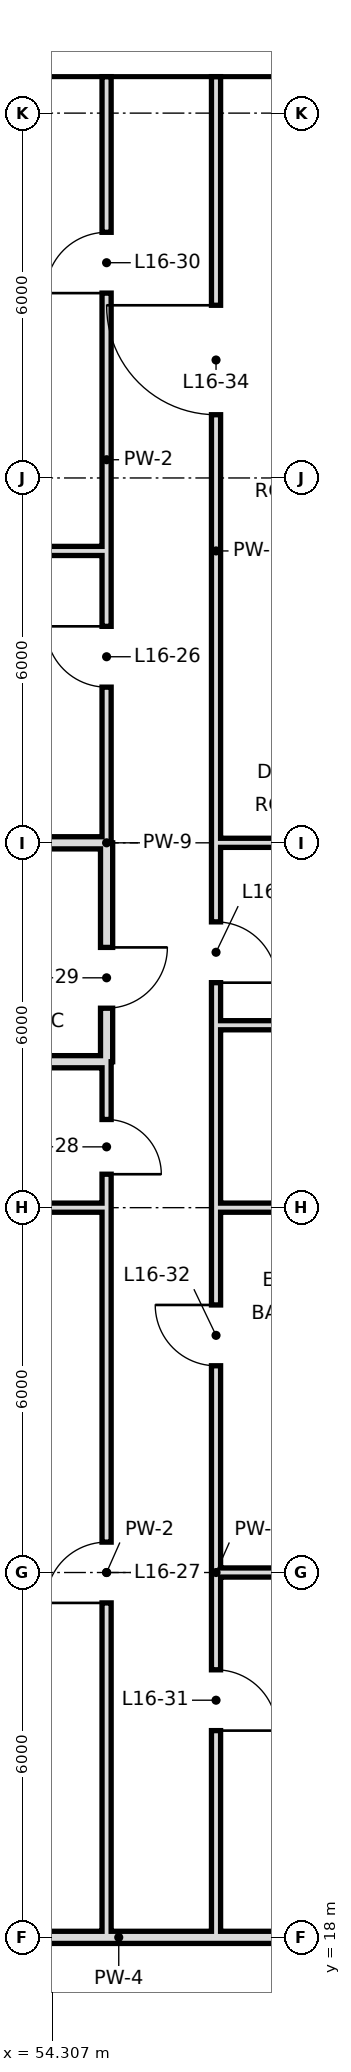
"""IFC4 building model, lengths in metres.
Left out: names, types, materials, properties, quantities, classifications, styles, units other than length and angle.
Written with IfcOpenShell. Run it as: python <this file> out.ifc"""

import sys

from ifc_helpers import new_model, si_unit, direction, frame, frame_2d, origin, place, context, subcontext, project, spatial, rectangle, extrude, element, fill, save


model = new_model("IFC4")
c1 = context("Model", 3, precision=1e-05, world=origin(), true_north=direction((0.0, 1.0)))
c2 = subcontext(c1, "Body", "Model", "MODEL_VIEW")
j1 = project(units=[si_unit("LENGTHUNIT", "METRE"), si_unit("PLANEANGLEUNIT", "RADIAN")], contexts=[c1])
p1 = place(None, origin())
s1 = spatial("IfcSite", under=j1, at=p1, CompositionType="ELEMENT")
p2 = place(p1, origin())
s2 = spatial("IfcBuilding", under=s1, at=p2, CompositionType="ELEMENT")
p3 = place(p2, frame((0.0, 0.0, 78.6)))
s3 = spatial("IfcBuildingStorey", under=s2, at=p3, CompositionType="ELEMENT", Elevation=78.6)
p4 = place(p3, frame((55.2, 32.4, 0.0), z_axis=(0.0, 0.0, 1.0), x_axis=(0.0, 1.0, 0.0)))
e1 = element("IfcWall", 1, at=p4, inside=s3, PredefinedType="SOLIDWALL", context=c2, shape_type="SweptSolid", body=[
    extrude(rectangle(XDim=3.6, YDim=0.2, at=frame_2d((1.8, 0.0))), origin(), (0.0, 0.0, 1.0), 2.52),
])
p5 = place(p4, frame((0.88, 0.0, 0.0)))
e2 = element("IfcOpeningElement", 2, at=p5, cuts=e1, PredefinedType="OPENING", context=c2, shape_type="SweptSolid", body=[
    extrude(rectangle(XDim=1.0, YDim=2.4, at=frame_2d((0.5, 1.2))), frame((0.0, 0.11, 0.0), z_axis=(0.0, -1.0, 0.0), x_axis=(1.0, 0.0, 0.0)), (0.0, 0.0, 1.0), 0.22),
])
p6 = place(p3, frame((55.2, 18.0, 0.0), z_axis=(0.0, 0.0, 1.0), x_axis=(0.0, 1.0, 0.0)))
e3 = element("IfcWall", 3, at=p6, inside=s3, PredefinedType="PARTITIONING", context=c2, shape_type="SweptSolid", body=[
    extrude(rectangle(XDim=12.0, YDim=0.15, at=frame_2d((6.0, 0.0))), origin(), (0.0, 0.0, 1.0), 3.42),
])
p7 = place(p6, frame((5.5, 0.0, 0.0)))
e4 = element("IfcOpeningElement", 4, at=p7, cuts=e3, PredefinedType="OPENING", context=c2, shape_type="SweptSolid", body=[
    extrude(rectangle(XDim=1.0, YDim=2.4, at=frame_2d((0.5, 1.2))), frame((0.0, 0.085, 0.0), z_axis=(0.0, -1.0, 0.0), x_axis=(1.0, 0.0, 0.0)), (0.0, 0.0, 1.0), 0.17),
])
p8 = place(p3, frame((55.2, 36.0, 0.0), z_axis=(0.0, 0.0, 1.0), x_axis=(0.0, 1.0, 0.0)))
e5 = element("IfcWall", 5, at=p8, inside=s3, PredefinedType="PARTITIONING", context=c2, shape_type="SweptSolid", body=[
    extrude(rectangle(XDim=12.6, YDim=0.15, at=frame_2d((6.3, 0.0))), origin(), (0.0, 0.0, 1.0), 3.42),
])
p9 = place(p8, frame((2.56, 0.0, 0.0)))
e6 = element("IfcOpeningElement", 6, at=p9, cuts=e5, PredefinedType="OPENING", context=c2, shape_type="SweptSolid", body=[
    extrude(rectangle(XDim=1.0, YDim=2.4, at=frame_2d((0.5, 1.2))), frame((0.0, 0.085, 0.0), z_axis=(0.0, -1.0, 0.0), x_axis=(1.0, 0.0, 0.0)), (0.0, 0.0, 1.0), 0.17),
])
p10 = place(p8, frame((9.04, 0.0, 0.0)))
e7 = element("IfcOpeningElement", 7, at=p10, cuts=e5, PredefinedType="OPENING", context=c2, shape_type="SweptSolid", body=[
    extrude(rectangle(XDim=1.0, YDim=2.4, at=frame_2d((0.5, 1.2))), frame((0.0, 0.085, 0.0), z_axis=(0.0, -1.0, 0.0), x_axis=(1.0, 0.0, 0.0)), (0.0, 0.0, 1.0), 0.17),
])
p11 = place(p3, frame((55.2, 30.0, 0.0), z_axis=(0.0, 0.0, 1.0), x_axis=(0.0, 1.0, 0.0)))
e8 = element("IfcWall", 8, at=p11, inside=s3, PredefinedType="PARTITIONING", context=c2, shape_type="SweptSolid", body=[
    extrude(rectangle(XDim=2.4, YDim=0.15, at=frame_2d((1.2, 0.0))), origin(), (0.0, 0.0, 1.0), 3.42),
])
p12 = place(p11, frame((0.55, 0.0, 0.0)))
e9 = element("IfcOpeningElement", 9, at=p12, cuts=e8, PredefinedType="OPENING", context=c2, shape_type="SweptSolid", body=[
    extrude(rectangle(XDim=0.9, YDim=2.4, at=frame_2d((0.45, 1.2))), frame((0.0, 0.085, 0.0), z_axis=(0.0, -1.0, 0.0), x_axis=(1.0, 0.0, 0.0)), (0.0, 0.0, 1.0), 0.17),
])
p13 = place(p3, frame((57.0, 18.0, 0.0), z_axis=(0.0, 0.0, 1.0), x_axis=(0.0, 1.0, 0.0)))
e10 = element("IfcWall", 10, at=p13, inside=s3, PredefinedType="PARTITIONING", context=c2, shape_type="SweptSolid", body=[
    extrude(rectangle(XDim=12.0, YDim=0.15, at=frame_2d((6.0, 0.0))), origin(), (0.0, 0.0, 1.0), 3.42),
])
p14 = place(p13, frame((3.4, 0.0, 0.0)))
e11 = element("IfcOpeningElement", 11, at=p14, cuts=e10, PredefinedType="OPENING", context=c2, shape_type="SweptSolid", body=[
    extrude(rectangle(XDim=1.0, YDim=2.4, at=frame_2d((0.5, 1.2))), frame((0.0, 0.085, 0.0), z_axis=(0.0, -1.0, 0.0), x_axis=(1.0, 0.0, 0.0)), (0.0, 0.0, 1.0), 0.17),
])
p15 = place(p13, frame((9.4, 0.0, 0.0)))
e12 = element("IfcOpeningElement", 12, at=p15, cuts=e10, PredefinedType="OPENING", context=c2, shape_type="SweptSolid", body=[
    extrude(rectangle(XDim=1.0, YDim=2.4, at=frame_2d((0.5, 1.2))), frame((0.0, 0.085, 0.0), z_axis=(0.0, -1.0, 0.0), x_axis=(1.0, 0.0, 0.0)), (0.0, 0.0, 1.0), 0.17),
])
p16 = place(p3, frame((57.0, 33.0, 0.0), z_axis=(0.0, 0.0, 1.0), x_axis=(0.0, 1.0, 0.0)))
e13 = element("IfcWall", 13, at=p16, inside=s3, PredefinedType="PARTITIONING", context=c2, shape_type="SweptSolid", body=[
    extrude(rectangle(XDim=15.6, YDim=0.15, at=frame_2d((7.8, 0.0))), origin(), (0.0, 0.0, 1.0), 3.42),
])
p17 = place(p16, frame((0.7, 0.0, 0.0)))
e14 = element("IfcOpeningElement", 14, at=p17, cuts=e13, PredefinedType="OPENING", context=c2, shape_type="SweptSolid", body=[
    extrude(rectangle(XDim=1.0, YDim=2.4, at=frame_2d((0.5, 1.2))), frame((0.0, 0.085, 0.0), z_axis=(0.0, -1.0, 0.0), x_axis=(1.0, 0.0, 0.0)), (0.0, 0.0, 1.0), 0.17),
])
p18 = place(p16, frame((10.04, 0.0, 0.0)))
e15 = element("IfcOpeningElement", 15, at=p18, cuts=e13, PredefinedType="OPENING", context=c2, shape_type="SweptSolid", body=[
    extrude(rectangle(XDim=1.8, YDim=2.4, at=frame_2d((0.9, 1.2))), frame((0.0, 0.085, 0.0), z_axis=(0.0, -1.0, 0.0), x_axis=(1.0, 0.0, 0.0)), (0.0, 0.0, 1.0), 0.17),
])
p19 = place(p3, frame((57.0, 30.0, 0.0), z_axis=(0.0, 0.0, 1.0), x_axis=(0.0, 1.0, 0.0)))
e16 = element("IfcWall", 16, at=p19, inside=s3, PredefinedType="PARTITIONING", context=c2, shape_type="SweptSolid", body=[
    extrude(rectangle(XDim=3.0, YDim=0.15, at=frame_2d((1.5, 0.0))), origin(), (0.0, 0.0, 1.0), 3.42),
])
p20 = place(p3, frame((44.9, 18.0, 0.0), z_axis=(0.0, 0.0, 1.0), x_axis=(1.0, 0.0, 0.0)))
e17 = element("IfcWall", 17, at=p20, inside=s3, PredefinedType="SOLIDWALL", context=c2, shape_type="SweptSolid", body=[
    extrude(rectangle(XDim=21.7, YDim=0.2, at=frame_2d((10.85, 0.0))), origin(), (0.0, 0.0, 1.0), 2.52),
])
p21 = place(p3, frame((57.0, 24.0, 0.0), z_axis=(0.0, 0.0, 1.0), x_axis=(1.0, 0.0, 0.0)))
e18 = element("IfcWall", 18, at=p21, inside=s3, PredefinedType="PARTITIONING", context=c2, shape_type="SweptSolid", body=[
    extrude(rectangle(XDim=9.0, YDim=0.15, at=frame_2d((4.5, 0.0))), origin(), (0.0, 0.0, 1.0), 2.52),
])
p22 = place(p3, frame((44.9, 30.0, 0.0), z_axis=(0.0, 0.0, 1.0), x_axis=(1.0, 0.0, 0.0)))
e19 = element("IfcWall", 19, at=p22, inside=s3, PredefinedType="PARTITIONING", context=c2, shape_type="SweptSolid", body=[
    extrude(rectangle(XDim=10.3, YDim=0.15, at=frame_2d((5.15, 0.0))), origin(), (0.0, 0.0, 1.0), 2.52),
])
p23 = place(p3, frame((57.0, 30.0, 0.0), z_axis=(0.0, 0.0, 1.0), x_axis=(1.0, 0.0, 0.0)))
e20 = element("IfcWall", 20, at=p23, inside=s3, PredefinedType="PARTITIONING", context=c2, shape_type="SweptSolid", body=[
    extrude(rectangle(XDim=3.0, YDim=0.15, at=frame_2d((1.5, 0.0))), origin(), (0.0, 0.0, 1.0), 2.52),
])
p24 = place(p3, frame((44.9, 32.4, 0.0), z_axis=(0.0, 0.0, 1.0), x_axis=(1.0, 0.0, 0.0)))
e21 = element("IfcWall", 21, at=p24, inside=s3, PredefinedType="SOLIDWALL", context=c2, shape_type="SweptSolid", body=[
    extrude(rectangle(XDim=10.3, YDim=0.2, at=frame_2d((5.15, 0.0))), origin(), (0.0, 0.0, 1.0), 2.97),
])
p25 = place(p3, frame((57.0, 33.0, 0.0), z_axis=(0.0, 0.0, 1.0), x_axis=(1.0, 0.0, 0.0)))
e22 = element("IfcWall", 22, at=p25, inside=s3, PredefinedType="PARTITIONING", context=c2, shape_type="SweptSolid", body=[
    extrude(rectangle(XDim=3.0, YDim=0.15, at=frame_2d((1.5, 0.0))), origin(), (0.0, 0.0, 1.0), 3.42),
])
p26 = place(p3, frame((44.9, 36.0, 0.0), z_axis=(0.0, 0.0, 1.0), x_axis=(1.0, 0.0, 0.0)))
e23 = element("IfcWall", 23, at=p26, inside=s3, PredefinedType="SOLIDWALL", context=c2, shape_type="SweptSolid", body=[
    extrude(rectangle(XDim=10.3, YDim=0.2, at=frame_2d((5.15, 0.0))), origin(), (0.0, 0.0, 1.0), 2.52),
])
p27 = place(p3, frame((57.0, 36.0, 0.0), z_axis=(0.0, 0.0, 1.0), x_axis=(1.0, 0.0, 0.0)))
e24 = element("IfcWall", 24, at=p27, inside=s3, PredefinedType="PARTITIONING", context=c2, shape_type="SweptSolid", body=[
    extrude(rectangle(XDim=9.0, YDim=0.15, at=frame_2d((4.5, 0.0))), origin(), (0.0, 0.0, 1.0), 2.52),
])
p28 = place(p3, frame((44.9, 40.8, 0.0), z_axis=(0.0, 0.0, 1.0), x_axis=(1.0, 0.0, 0.0)))
e25 = element("IfcWall", 25, at=p28, inside=s3, PredefinedType="PARTITIONING", context=c2, shape_type="SweptSolid", body=[
    extrude(rectangle(XDim=10.3, YDim=0.15, at=frame_2d((5.15, 0.0))), origin(), (0.0, 0.0, 1.0), 3.42),
])
p29 = place(p9, frame((1.0, 0.0, 0.0), z_axis=(0.0, 0.0, 1.0), x_axis=(-1.0, 0.0, 0.0)))
e26 = element("IfcDoor", 26, at=p29, inside=s3, OperationType="SINGLE_SWING_LEFT", PredefinedType="DOOR", context=c2, shape_type="SweptSolid", body=[
    extrude(rectangle(XDim=1.0, YDim=2.4, at=frame_2d((0.5, 1.2))), frame((0.0, 0.025, 0.0), z_axis=(0.0, -1.0, 0.0), x_axis=(1.0, 0.0, 0.0)), (0.0, 0.0, 1.0), 0.05),
])
fill(e6, e26)
p30 = place(p7, origin())
e27 = element("IfcDoor", 27, at=p30, inside=s3, OperationType="SINGLE_SWING_LEFT", PredefinedType="DOOR", context=c2, shape_type="SweptSolid", body=[
    extrude(rectangle(XDim=1.0, YDim=2.4, at=frame_2d((0.5, 1.2))), frame((0.0, 0.025, 0.0), z_axis=(0.0, -1.0, 0.0), x_axis=(1.0, 0.0, 0.0)), (0.0, 0.0, 1.0), 0.05),
])
fill(e4, e27)
p31 = place(p12, frame((0.9, 0.0, 0.0), z_axis=(0.0, 0.0, 1.0), x_axis=(-1.0, 0.0, 0.0)))
e28 = element("IfcDoor", 28, at=p31, inside=s3, OperationType="SINGLE_SWING_RIGHT", PredefinedType="DOOR", context=c2, shape_type="SweptSolid", body=[
    extrude(rectangle(XDim=0.9, YDim=2.4, at=frame_2d((0.45, 1.2))), frame((0.0, 0.025, 0.0), z_axis=(0.0, -1.0, 0.0), x_axis=(1.0, 0.0, 0.0)), (0.0, 0.0, 1.0), 0.05),
])
fill(e9, e28)
p32 = place(p5, origin())
e29 = element("IfcDoor", 29, at=p32, inside=s3, OperationType="SINGLE_SWING_RIGHT", PredefinedType="DOOR", context=c2, shape_type="SweptSolid", body=[
    extrude(rectangle(XDim=1.0, YDim=2.4, at=frame_2d((0.5, 1.2))), frame((0.0, 0.025, 0.0), z_axis=(0.0, -1.0, 0.0), x_axis=(1.0, 0.0, 0.0)), (0.0, 0.0, 1.0), 0.05),
])
fill(e2, e29)
p33 = place(p10, origin())
e30 = element("IfcDoor", 30, at=p33, inside=s3, OperationType="SINGLE_SWING_LEFT", PredefinedType="DOOR", context=c2, shape_type="SweptSolid", body=[
    extrude(rectangle(XDim=1.0, YDim=2.4, at=frame_2d((0.5, 1.2))), frame((0.0, 0.025, 0.0), z_axis=(0.0, -1.0, 0.0), x_axis=(1.0, 0.0, 0.0)), (0.0, 0.0, 1.0), 0.05),
])
fill(e7, e30)
p34 = place(p14, frame((1.0, 0.0, 0.0), z_axis=(0.0, 0.0, 1.0), x_axis=(-1.0, 0.0, 0.0)))
e31 = element("IfcDoor", 31, at=p34, inside=s3, OperationType="SINGLE_SWING_RIGHT", PredefinedType="DOOR", context=c2, shape_type="SweptSolid", body=[
    extrude(rectangle(XDim=1.0, YDim=2.4, at=frame_2d((0.5, 1.2))), frame((0.0, 0.025, 0.0), z_axis=(0.0, -1.0, 0.0), x_axis=(1.0, 0.0, 0.0)), (0.0, 0.0, 1.0), 0.05),
])
fill(e11, e31)
p35 = place(p15, frame((1.0, 0.0, 0.0), z_axis=(0.0, 0.0, 1.0), x_axis=(-1.0, 0.0, 0.0)))
e32 = element("IfcDoor", 32, at=p35, inside=s3, OperationType="SINGLE_SWING_LEFT", PredefinedType="DOOR", context=c2, shape_type="SweptSolid", body=[
    extrude(rectangle(XDim=1.0, YDim=2.4, at=frame_2d((0.5, 1.2))), frame((0.0, 0.025, 0.0), z_axis=(0.0, -1.0, 0.0), x_axis=(1.0, 0.0, 0.0)), (0.0, 0.0, 1.0), 0.05),
])
fill(e12, e32)
p36 = place(p17, frame((1.0, 0.0, 0.0), z_axis=(0.0, 0.0, 1.0), x_axis=(-1.0, 0.0, 0.0)))
e33 = element("IfcDoor", 33, at=p36, inside=s3, OperationType="SINGLE_SWING_RIGHT", PredefinedType="DOOR", context=c2, shape_type="SweptSolid", body=[
    extrude(rectangle(XDim=1.0, YDim=2.4, at=frame_2d((0.5, 1.2))), frame((0.0, 0.025, 0.0), z_axis=(0.0, -1.0, 0.0), x_axis=(1.0, 0.0, 0.0)), (0.0, 0.0, 1.0), 0.05),
])
fill(e14, e33)
p37 = place(p18, frame((1.8, 0.0, 0.0), z_axis=(0.0, 0.0, 1.0), x_axis=(-1.0, 0.0, 0.0)))
e34 = element("IfcDoor", 34, at=p37, inside=s3, OperationType="SINGLE_SWING_LEFT", PredefinedType="DOOR", context=c2, shape_type="SweptSolid", body=[
    extrude(rectangle(XDim=1.8, YDim=2.4, at=frame_2d((0.9, 1.2))), frame((0.0, 0.025, 0.0), z_axis=(0.0, -1.0, 0.0), x_axis=(1.0, 0.0, 0.0)), (0.0, 0.0, 1.0), 0.05),
])
fill(e15, e34)
save(model, sys.argv[1])
